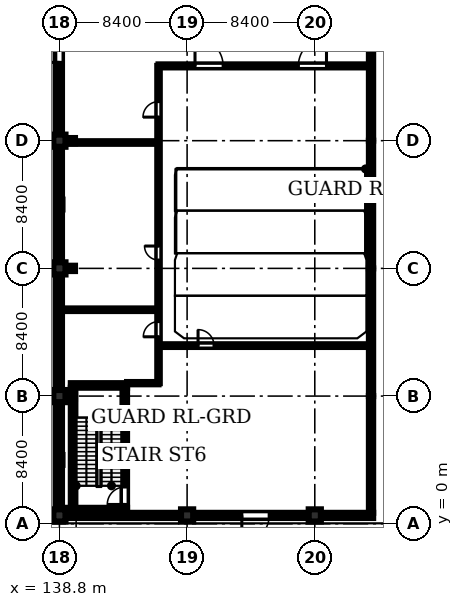
"""IFC4 building model, lengths in metres.
Left out: names, types, materials, properties, quantities, classifications, styles, units other than length and angle.
Written with IfcOpenShell. Run it as: python <this file> out.ifc"""

import sys

from ifc_helpers import new_model, si_unit, direction, frame, frame_2d, origin, origin_2d, place, context, subcontext, project, spatial, rectangle, i_section, extrude, element, fill, save


model = new_model("IFC4")
c1 = context("Model", 3, precision=1e-05, world=origin(), true_north=direction((0.0, 1.0)))
c2 = subcontext(c1, "Body", "Model", "MODEL_VIEW")
j1 = project(units=[si_unit("LENGTHUNIT", "METRE"), si_unit("PLANEANGLEUNIT", "RADIAN")], contexts=[c1])
p1 = place(None, origin())
s1 = spatial("IfcSite", under=j1, at=p1, CompositionType="ELEMENT")
p2 = place(p1, origin())
s2 = spatial("IfcBuilding", under=s1, at=p2, CompositionType="ELEMENT")
p3 = place(p2, origin())
s3 = spatial("IfcBuildingStorey", under=s2, at=p3, CompositionType="ELEMENT", Elevation=0.0)
for number, where, z_axis, x_axis in (
    (1, (138.8, 0.55, 0.0), (0.0, 0.0, 1.0), (1.0, 0.0, 0.0)),
    (2, (138.8, 8.4, 0.0), (0.0, 0.0, 1.0), (1.0, 0.0, 0.0)),
    (3, (138.8, 16.8, 0.0), (0.0, 0.0, 1.0), (1.0, 0.0, 0.0)),
    (4, (138.8, 25.2, 0.0), (0.0, 0.0, 1.0), (1.0, 0.0, 0.0)),
    (5, (147.2, 0.55, 0.0), (0.0, 0.0, 1.0), (1.0, 0.0, 0.0)),
    (6, (155.6, 0.55, 0.0), (0.0, 0.0, 1.0), (1.0, 0.0, 0.0)),
):
    element("IfcColumn", number, at=place(p3, frame(where, z_axis=z_axis, x_axis=x_axis)), inside=s3, PredefinedType="COLUMN", context=c2, shape_type="SweptSolid", body=[
        extrude(rectangle(XDim=0.8, YDim=0.8, at=origin_2d()), origin(), (0.0, 0.0, 1.0), 5.18),
    ])
for number, where, z_axis, x_axis in (
    (7, (138.8, 4.2, 0.0), (0.0, 0.0, 1.0), (1.0, 0.0, 0.0)),
    (8, (138.8, 21.0, 0.0), (0.0, 0.0, 1.0), (1.0, 0.0, 0.0)),
):
    element("IfcColumn", number, at=place(p3, frame(where, z_axis=z_axis, x_axis=x_axis)), inside=s3, PredefinedType="PILASTER", context=c2, shape_type="SweptSolid", body=[
        extrude(rectangle(XDim=0.4, YDim=0.65, at=origin_2d()), origin(), (0.0, 0.0, 1.0), 5.18),
    ])
p4 = place(p3, frame((139.2, 0.9, 0.0), z_axis=(0.0, 0.0, 1.0), x_axis=(1.0, 0.0, 0.0)))
e9 = element("IfcWall", 9, at=p4, inside=s3, PredefinedType="SHEAR", context=c2, shape_type="SweptSolid", body=[
    extrude(rectangle(XDim=4.05, YDim=0.3, at=frame_2d((2.025, 0.0))), origin(), (0.0, 0.0, 1.0), 5.18),
])
p5 = place(p3, frame((139.55, 9.1, 0.0), z_axis=(0.0, 0.0, 1.0), x_axis=(1.0, 0.0, 0.0)))
e10 = element("IfcWall", 10, at=p5, inside=s3, PredefinedType="SHEAR", context=c2, shape_type="SweptSolid", body=[
    extrude(rectangle(XDim=3.7, YDim=0.3, at=frame_2d((1.85, 0.0))), origin(), (0.0, 0.0, 1.0), 5.18),
])
p6 = place(p3, frame((139.7, 1.05, 0.0), z_axis=(0.0, 0.0, 1.0), x_axis=(0.0, 1.0, 0.0)))
e11 = element("IfcWall", 11, at=p6, inside=s3, PredefinedType="SHEAR", context=c2, shape_type="SweptSolid", body=[
    extrude(rectangle(XDim=7.9, YDim=0.3, at=frame_2d((3.95, 0.0))), origin(), (0.0, 0.0, 1.0), 5.18),
])
p7 = place(p3, frame((143.1, 1.05, 0.0), z_axis=(0.0, 0.0, 1.0), x_axis=(0.0, 1.0, 0.0)))
e12 = element("IfcWall", 12, at=p7, inside=s3, PredefinedType="SHEAR", context=c2, shape_type="SweptSolid", body=[
    extrude(rectangle(XDim=7.9, YDim=0.3, at=frame_2d((3.95, 0.0))), origin(), (0.0, 0.0, 1.0), 5.18),
])
p8 = place(p7, frame((0.22, 0.0, 0.0)))
e13 = element("IfcOpeningElement", 13, at=p8, cuts=e12, PredefinedType="OPENING", context=c2, shape_type="SweptSolid", body=[
    extrude(rectangle(XDim=1.15, YDim=2.15, at=frame_2d((0.575, 1.075))), frame((0.0, 0.16, 0.0), z_axis=(0.0, -1.0, 0.0), x_axis=(1.0, 0.0, 0.0)), (0.0, 0.0, 1.0), 0.32),
])
p9 = place(p3, frame((139.65, 8.4, 0.0), z_axis=(0.0, 0.0, 1.0), x_axis=(1.0, 0.0, 0.0)))
e14 = element("IfcColumn", 14, at=p9, inside=s3, PredefinedType="COLUMN", context=c2, shape_type="SweptSolid", body=[
    extrude(i_section(OverallWidth=0.35, OverallDepth=0.35, WebThickness=0.012, FlangeThickness=0.019, at=origin_2d()), origin(), (0.0, 0.0, 1.0), 5.18),
])
for number, where, z_axis, x_axis in (
    (15, (139.65, 16.8, 0.0), (0.0, 0.0, 1.0), (1.0, 0.0, 0.0)),
    (16, (139.65, 25.2, 0.0), (0.0, 0.0, 1.0), (1.0, 0.0, 0.0)),
):
    element("IfcColumn", number, at=place(p3, frame(where, z_axis=z_axis, x_axis=x_axis)), inside=s3, PredefinedType="COLUMN", context=c2, shape_type="SweptSolid", body=[
        extrude(i_section(OverallWidth=0.35, OverallDepth=0.35, WebThickness=0.012, FlangeThickness=0.019, at=origin_2d()), origin(), (0.0, 0.0, 1.0), 5.4),
    ])
p10 = place(p3, frame((159.3, 8.4, 0.0), z_axis=(0.0, 0.0, 1.0), x_axis=(0.0, -1.0, 0.0)))
e17 = element("IfcWall", 17, at=p10, inside=s3, PredefinedType="STANDARD", context=c2, shape_type="SweptSolid", body=[
    extrude(rectangle(XDim=7.68, YDim=0.28, at=frame_2d((3.84, 0.0))), origin(), (0.0, 0.0, 1.0), 5.18),
])
p11 = place(p3, frame((159.3, 16.8, 0.0), z_axis=(0.0, 0.0, 1.0), x_axis=(0.0, -1.0, 0.0)))
e18 = element("IfcWall", 18, at=p11, inside=s3, PredefinedType="STANDARD", context=c2, shape_type="SweptSolid", body=[
    extrude(rectangle(XDim=8.4, YDim=0.28, at=frame_2d((4.2, 0.0))), origin(), (0.0, 0.0, 1.0), 5.18),
])
p12 = place(p3, frame((159.3, 25.2, 0.0), z_axis=(0.0, 0.0, 1.0), x_axis=(0.0, -1.0, 0.0)))
e19 = element("IfcWall", 19, at=p12, inside=s3, PredefinedType="STANDARD", context=c2, shape_type="SweptSolid", body=[
    extrude(rectangle(XDim=8.4, YDim=0.28, at=frame_2d((4.2, 0.0))), origin(), (0.0, 0.0, 1.0), 5.18),
])
p13 = place(p3, frame((159.3, 33.6, 0.0), z_axis=(0.0, 0.0, 1.0), x_axis=(0.0, -1.0, 0.0)))
e20 = element("IfcWall", 20, at=p13, inside=s3, PredefinedType="STANDARD", context=c2, shape_type="SweptSolid", body=[
    extrude(rectangle(XDim=8.4, YDim=0.28, at=frame_2d((4.2, 0.0))), origin(), (0.0, 0.0, 1.0), 5.18),
])
p14 = place(p3, frame((138.8, 0.95, 0.0), z_axis=(0.0, 0.0, 1.0), x_axis=(0.0, 1.0, 0.0)))
e21 = element("IfcWall", 21, at=p14, inside=s3, PredefinedType="STANDARD", context=c2, shape_type="SweptSolid", body=[
    extrude(rectangle(XDim=7.05, YDim=0.34, at=frame_2d((3.525, 0.0))), origin(), (0.0, 0.0, 1.0), 4.43),
])
p15 = place(p3, frame((138.8, 8.8, 0.0), z_axis=(0.0, 0.0, 1.0), x_axis=(0.0, 1.0, 0.0)))
e22 = element("IfcWall", 22, at=p15, inside=s3, PredefinedType="STANDARD", context=c2, shape_type="SweptSolid", body=[
    extrude(rectangle(XDim=7.6, YDim=0.34, at=frame_2d((3.8, 0.0))), origin(), (0.0, 0.0, 1.0), 4.43),
])
p16 = place(p15, frame((0.85, 0.0, 1.6)))
e23 = element("IfcOpeningElement", 23, at=p16, cuts=e22, PredefinedType="OPENING", context=c2, shape_type="SweptSolid", body=[
    extrude(rectangle(XDim=1.4, YDim=1.4, at=frame_2d((0.7, 0.7))), frame((0.0, 0.18, 0.0), z_axis=(0.0, -1.0, 0.0), x_axis=(1.0, 0.0, 0.0)), (0.0, 0.0, 1.0), 0.36),
])
p17 = place(p3, frame((138.8, 17.2, 0.0), z_axis=(0.0, 0.0, 1.0), x_axis=(0.0, 1.0, 0.0)))
e24 = element("IfcWall", 24, at=p17, inside=s3, PredefinedType="STANDARD", context=c2, shape_type="SweptSolid", body=[
    extrude(rectangle(XDim=7.6, YDim=0.34, at=frame_2d((3.8, 0.0))), origin(), (0.0, 0.0, 1.0), 4.43),
])
p18 = place(p17, frame((0.85, 0.0, 1.6)))
e25 = element("IfcOpeningElement", 25, at=p18, cuts=e24, PredefinedType="OPENING", context=c2, shape_type="SweptSolid", body=[
    extrude(rectangle(XDim=1.4, YDim=1.4, at=frame_2d((0.7, 0.7))), frame((0.0, 0.18, 0.0), z_axis=(0.0, -1.0, 0.0), x_axis=(1.0, 0.0, 0.0)), (0.0, 0.0, 1.0), 0.36),
])
p19 = place(p3, frame((138.8, 25.6, 0.0), z_axis=(0.0, 0.0, 1.0), x_axis=(0.0, 1.0, 0.0)))
e26 = element("IfcWall", 26, at=p19, inside=s3, PredefinedType="STANDARD", context=c2, shape_type="SweptSolid", body=[
    extrude(rectangle(XDim=7.6, YDim=0.34, at=frame_2d((3.8, 0.0))), origin(), (0.0, 0.0, 1.0), 4.43),
])
p20 = place(p19, frame((4.75, 0.0, 0.0)))
e27 = element("IfcOpeningElement", 27, at=p20, cuts=e26, PredefinedType="OPENING", context=c2, shape_type="SweptSolid", body=[
    extrude(rectangle(XDim=1.8, YDim=2.3, at=frame_2d((0.9, 1.15))), frame((0.0, 0.18, 0.0), z_axis=(0.0, -1.0, 0.0), x_axis=(1.0, 0.0, 0.0)), (0.0, 0.0, 1.0), 0.36),
])
p21 = place(p3, frame((146.8, 0.55, 0.0), z_axis=(0.0, 0.0, 1.0), x_axis=(-1.0, 0.0, 0.0)))
e28 = element("IfcWall", 28, at=p21, inside=s3, PredefinedType="STANDARD", context=c2, shape_type="SweptSolid", body=[
    extrude(rectangle(XDim=7.6, YDim=0.34, at=frame_2d((3.8, 0.0))), origin(), (0.0, 0.0, 1.0), 4.43),
])
p22 = place(p3, frame((155.2, 0.55, 0.0), z_axis=(0.0, 0.0, 1.0), x_axis=(-1.0, 0.0, 0.0)))
e29 = element("IfcWall", 29, at=p22, inside=s3, PredefinedType="STANDARD", context=c2, shape_type="SweptSolid", body=[
    extrude(rectangle(XDim=7.6, YDim=0.34, at=frame_2d((3.8, 0.0))), origin(), (0.0, 0.0, 1.0), 4.43),
])
p23 = place(p22, frame((2.6, 0.0, 0.0)))
e30 = element("IfcOpeningElement", 30, at=p23, cuts=e29, PredefinedType="OPENING", context=c2, shape_type="SweptSolid", body=[
    extrude(rectangle(XDim=1.8, YDim=2.3, at=frame_2d((0.9, 1.15))), frame((0.0, 0.18, 0.0), z_axis=(0.0, -1.0, 0.0), x_axis=(1.0, 0.0, 0.0)), (0.0, 0.0, 1.0), 0.36),
])
p24 = place(p3, frame((159.44, 0.55, 0.0), z_axis=(0.0, 0.0, 1.0), x_axis=(-1.0, 0.0, 0.0)))
e31 = element("IfcWall", 31, at=p24, inside=s3, PredefinedType="STANDARD", context=c2, shape_type="SweptSolid", body=[
    extrude(rectangle(XDim=3.44, YDim=0.34, at=frame_2d((1.72, 0.0))), origin(), (0.0, 0.0, 1.0), 4.43),
])
p25 = place(p3, frame((145.32, 30.12, 0.0), z_axis=(0.0, 0.0, 1.0), x_axis=(1.0, 0.0, 0.0)))
e32 = element("IfcWall", 32, at=p25, inside=s3, PredefinedType="SOLIDWALL", context=c2, shape_type="SweptSolid", body=[
    extrude(rectangle(XDim=13.83, YDim=0.2, at=frame_2d((6.915, 0.0))), origin(), (0.0, 0.0, 1.0), 5.18),
])
p26 = place(p25, frame((2.4, 0.0, 0.0)))
e33 = element("IfcOpeningElement", 33, at=p26, cuts=e32, PredefinedType="OPENING", context=c2, shape_type="SweptSolid", body=[
    extrude(rectangle(XDim=1.85, YDim=2.25, at=frame_2d((0.925, 1.125))), frame((0.0, 0.11, 0.0), z_axis=(0.0, -1.0, 0.0), x_axis=(1.0, 0.0, 0.0)), (0.0, 0.0, 1.0), 0.22),
])
p27 = place(p25, frame((9.2, 0.0, 0.0)))
e34 = element("IfcOpeningElement", 34, at=p27, cuts=e32, PredefinedType="OPENING", context=c2, shape_type="SweptSolid", body=[
    extrude(rectangle(XDim=1.85, YDim=2.25, at=frame_2d((0.925, 1.125))), frame((0.0, 0.11, 0.0), z_axis=(0.0, -1.0, 0.0), x_axis=(1.0, 0.0, 0.0)), (0.0, 0.0, 1.0), 0.22),
])
p28 = place(p3, frame((145.32, 11.72, 0.0), z_axis=(0.0, 0.0, 1.0), x_axis=(1.0, 0.0, 0.0)))
e35 = element("IfcWall", 35, at=p28, inside=s3, PredefinedType="STANDARD", context=c2, shape_type="SweptSolid", body=[
    extrude(rectangle(XDim=13.83, YDim=0.18, at=frame_2d((6.915, 0.0))), origin(), (0.0, 0.0, 1.0), 5.18),
])
p29 = place(p28, frame((2.6, 0.0, 0.0)))
e36 = element("IfcOpeningElement", 36, at=p29, cuts=e35, PredefinedType="OPENING", context=c2, shape_type="SweptSolid", body=[
    extrude(rectangle(XDim=1.05, YDim=2.15, at=frame_2d((0.525, 1.075))), frame((0.0, 0.1, 0.0), z_axis=(0.0, -1.0, 0.0), x_axis=(1.0, 0.0, 0.0)), (0.0, 0.0, 1.0), 0.2),
])
p30 = place(p3, frame((145.32, 9.25, 0.0), z_axis=(0.0, 0.0, 1.0), x_axis=(0.0, 1.0, 0.0)))
e37 = element("IfcWall", 37, at=p30, inside=s3, PredefinedType="PARTITIONING", context=c2, shape_type="SweptSolid", body=[
    extrude(rectangle(XDim=20.87, YDim=0.165, at=frame_2d((10.435, 0.0))), origin(), (0.0, 0.0, 1.0), 5.18),
])
p31 = place(p30, frame((3.05, 0.0, 0.0)))
e38 = element("IfcOpeningElement", 38, at=p31, cuts=e37, PredefinedType="OPENING", context=c2, shape_type="SweptSolid", body=[
    extrude(rectangle(XDim=1.0, YDim=2.12, at=frame_2d((0.5, 1.06))), frame((0.0, 0.093, 0.0), z_axis=(0.0, -1.0, 0.0), x_axis=(1.0, 0.0, 0.0)), (0.0, 0.0, 1.0), 0.185),
])
p32 = place(p30, frame((8.1, 0.0, 0.0)))
e39 = element("IfcOpeningElement", 39, at=p32, cuts=e37, PredefinedType="OPENING", context=c2, shape_type="SweptSolid", body=[
    extrude(rectangle(XDim=0.92, YDim=2.1, at=frame_2d((0.46, 1.05))), frame((0.0, 0.093, 0.0), z_axis=(0.0, -1.0, 0.0), x_axis=(1.0, 0.0, 0.0)), (0.0, 0.0, 1.0), 0.185),
])
p33 = place(p30, frame((17.5, 0.0, 0.0)))
e40 = element("IfcOpeningElement", 40, at=p33, cuts=e37, PredefinedType="OPENING", context=c2, shape_type="SweptSolid", body=[
    extrude(rectangle(XDim=1.02, YDim=2.15, at=frame_2d((0.51, 1.075))), frame((0.0, 0.093, 0.0), z_axis=(0.0, -1.0, 0.0), x_axis=(1.0, 0.0, 0.0)), (0.0, 0.0, 1.0), 0.185),
])
p34 = place(p3, frame((143.25, 9.25, 0.0), z_axis=(0.0, 0.0, 1.0), x_axis=(1.0, 0.0, 0.0)))
e41 = element("IfcWall", 41, at=p34, inside=s3, PredefinedType="PARTITIONING", context=c2, shape_type="SweptSolid", body=[
    extrude(rectangle(XDim=2.07, YDim=0.15, at=frame_2d((1.035, 0.0))), origin(), (0.0, 0.0, 1.0), 5.18),
])
for number, where, z_axis, x_axis in (
    (42, (139.2, 14.08, 0.0), (0.0, 0.0, 1.0), (1.0, 0.0, 0.0)),
    (43, (139.2, 25.08, 0.0), (0.0, 0.0, 1.0), (1.0, 0.0, 0.0)),
):
    element("IfcWall", number, at=place(p3, frame(where, z_axis=z_axis, x_axis=x_axis)), inside=s3, PredefinedType="PARTITIONING", context=c2, shape_type="SweptSolid", body=[
        extrude(rectangle(XDim=6.12, YDim=0.172, at=frame_2d((3.06, 0.0))), origin(), (0.0, 0.0, 1.0), 5.18),
    ])
p35 = place(p16, origin())
e44 = element("IfcWindow", 44, at=p35, inside=s3, PartitioningType="SINGLE_PANEL", PredefinedType="WINDOW", context=c2, shape_type="SweptSolid", body=[
    extrude(rectangle(XDim=1.4, YDim=1.4, at=frame_2d((0.7, 0.7))), frame((0.0, 0.03, 0.0), z_axis=(0.0, -1.0, 0.0), x_axis=(1.0, 0.0, 0.0)), (0.0, 0.0, 1.0), 0.06),
])
fill(e23, e44)
p36 = place(p18, origin())
e45 = element("IfcWindow", 45, at=p36, inside=s3, PartitioningType="SINGLE_PANEL", PredefinedType="WINDOW", context=c2, shape_type="SweptSolid", body=[
    extrude(rectangle(XDim=1.4, YDim=1.4, at=frame_2d((0.7, 0.7))), frame((0.0, 0.03, 0.0), z_axis=(0.0, -1.0, 0.0), x_axis=(1.0, 0.0, 0.0)), (0.0, 0.0, 1.0), 0.06),
])
fill(e25, e45)
p37 = place(p20, origin())
e46 = element("IfcDoor", 46, at=p37, inside=s3, OperationType="SINGLE_SWING_LEFT", PredefinedType="DOOR", context=c2, shape_type="SweptSolid", body=[
    extrude(rectangle(XDim=1.8, YDim=2.3, at=frame_2d((0.9, 1.15))), frame((0.0, 0.025, 0.0), z_axis=(0.0, -1.0, 0.0), x_axis=(1.0, 0.0, 0.0)), (0.0, 0.0, 1.0), 0.05),
])
fill(e27, e46)
p38 = place(p23, origin())
e47 = element("IfcDoor", 47, at=p38, inside=s3, OperationType="SINGLE_SWING_RIGHT", PredefinedType="DOOR", context=c2, shape_type="SweptSolid", body=[
    extrude(rectangle(XDim=1.8, YDim=2.3, at=frame_2d((0.9, 1.15))), frame((0.0, 0.025, 0.0), z_axis=(0.0, -1.0, 0.0), x_axis=(1.0, 0.0, 0.0)), (0.0, 0.0, 1.0), 0.05),
])
fill(e30, e47)
p39 = place(p26, origin())
e48 = element("IfcDoor", 48, at=p39, inside=s3, OperationType="SINGLE_SWING_LEFT", PredefinedType="DOOR", context=c2, shape_type="SweptSolid", body=[
    extrude(rectangle(XDim=1.85, YDim=2.25, at=frame_2d((0.925, 1.125))), frame((0.0, 0.025, 0.0), z_axis=(0.0, -1.0, 0.0), x_axis=(1.0, 0.0, 0.0)), (0.0, 0.0, 1.0), 0.05),
])
fill(e33, e48)
p40 = place(p27, origin())
e49 = element("IfcDoor", 49, at=p40, inside=s3, OperationType="SINGLE_SWING_RIGHT", PredefinedType="DOOR", context=c2, shape_type="SweptSolid", body=[
    extrude(rectangle(XDim=1.85, YDim=2.25, at=frame_2d((0.925, 1.125))), frame((0.0, 0.025, 0.0), z_axis=(0.0, -1.0, 0.0), x_axis=(1.0, 0.0, 0.0)), (0.0, 0.0, 1.0), 0.05),
])
fill(e34, e49)
p41 = place(p29, origin())
e50 = element("IfcDoor", 50, at=p41, inside=s3, OperationType="SINGLE_SWING_LEFT", PredefinedType="DOOR", context=c2, shape_type="SweptSolid", body=[
    extrude(rectangle(XDim=1.05, YDim=2.15, at=frame_2d((0.525, 1.075))), frame((0.0, 0.025, 0.0), z_axis=(0.0, -1.0, 0.0), x_axis=(1.0, 0.0, 0.0)), (0.0, 0.0, 1.0), 0.05),
])
fill(e36, e50)
p42 = place(p31, origin())
e51 = element("IfcDoor", 51, at=p42, inside=s3, OperationType="SINGLE_SWING_LEFT", PredefinedType="DOOR", context=c2, shape_type="SweptSolid", body=[
    extrude(rectangle(XDim=1.0, YDim=2.12, at=frame_2d((0.5, 1.06))), frame((0.0, 0.025, 0.0), z_axis=(0.0, -1.0, 0.0), x_axis=(1.0, 0.0, 0.0)), (0.0, 0.0, 1.0), 0.05),
])
fill(e38, e51)
p43 = place(p32, origin())
e52 = element("IfcDoor", 52, at=p43, inside=s3, OperationType="SINGLE_SWING_RIGHT", PredefinedType="DOOR", context=c2, shape_type="SweptSolid", body=[
    extrude(rectangle(XDim=0.92, YDim=2.1, at=frame_2d((0.46, 1.05))), frame((0.0, 0.025, 0.0), z_axis=(0.0, -1.0, 0.0), x_axis=(1.0, 0.0, 0.0)), (0.0, 0.0, 1.0), 0.05),
])
fill(e39, e52)
p44 = place(p33, origin())
e53 = element("IfcDoor", 53, at=p44, inside=s3, OperationType="SINGLE_SWING_LEFT", PredefinedType="DOOR", context=c2, shape_type="SweptSolid", body=[
    extrude(rectangle(XDim=1.02, YDim=2.15, at=frame_2d((0.51, 1.075))), frame((0.0, 0.025, 0.0), z_axis=(0.0, -1.0, 0.0), x_axis=(1.0, 0.0, 0.0)), (0.0, 0.0, 1.0), 0.05),
])
fill(e40, e53)
p45 = place(p8, origin())
e54 = element("IfcDoor", 54, at=p45, inside=s3, OperationType="SINGLE_SWING_LEFT", PredefinedType="DOOR", context=c2, shape_type="SweptSolid", body=[
    extrude(rectangle(XDim=1.15, YDim=2.15, at=frame_2d((0.575, 1.075))), frame((0.0, 0.025, 0.0), z_axis=(0.0, -1.0, 0.0), x_axis=(1.0, 0.0, 0.0)), (0.0, 0.0, 1.0), 0.05),
])
fill(e13, e54)
save(model, sys.argv[1])
